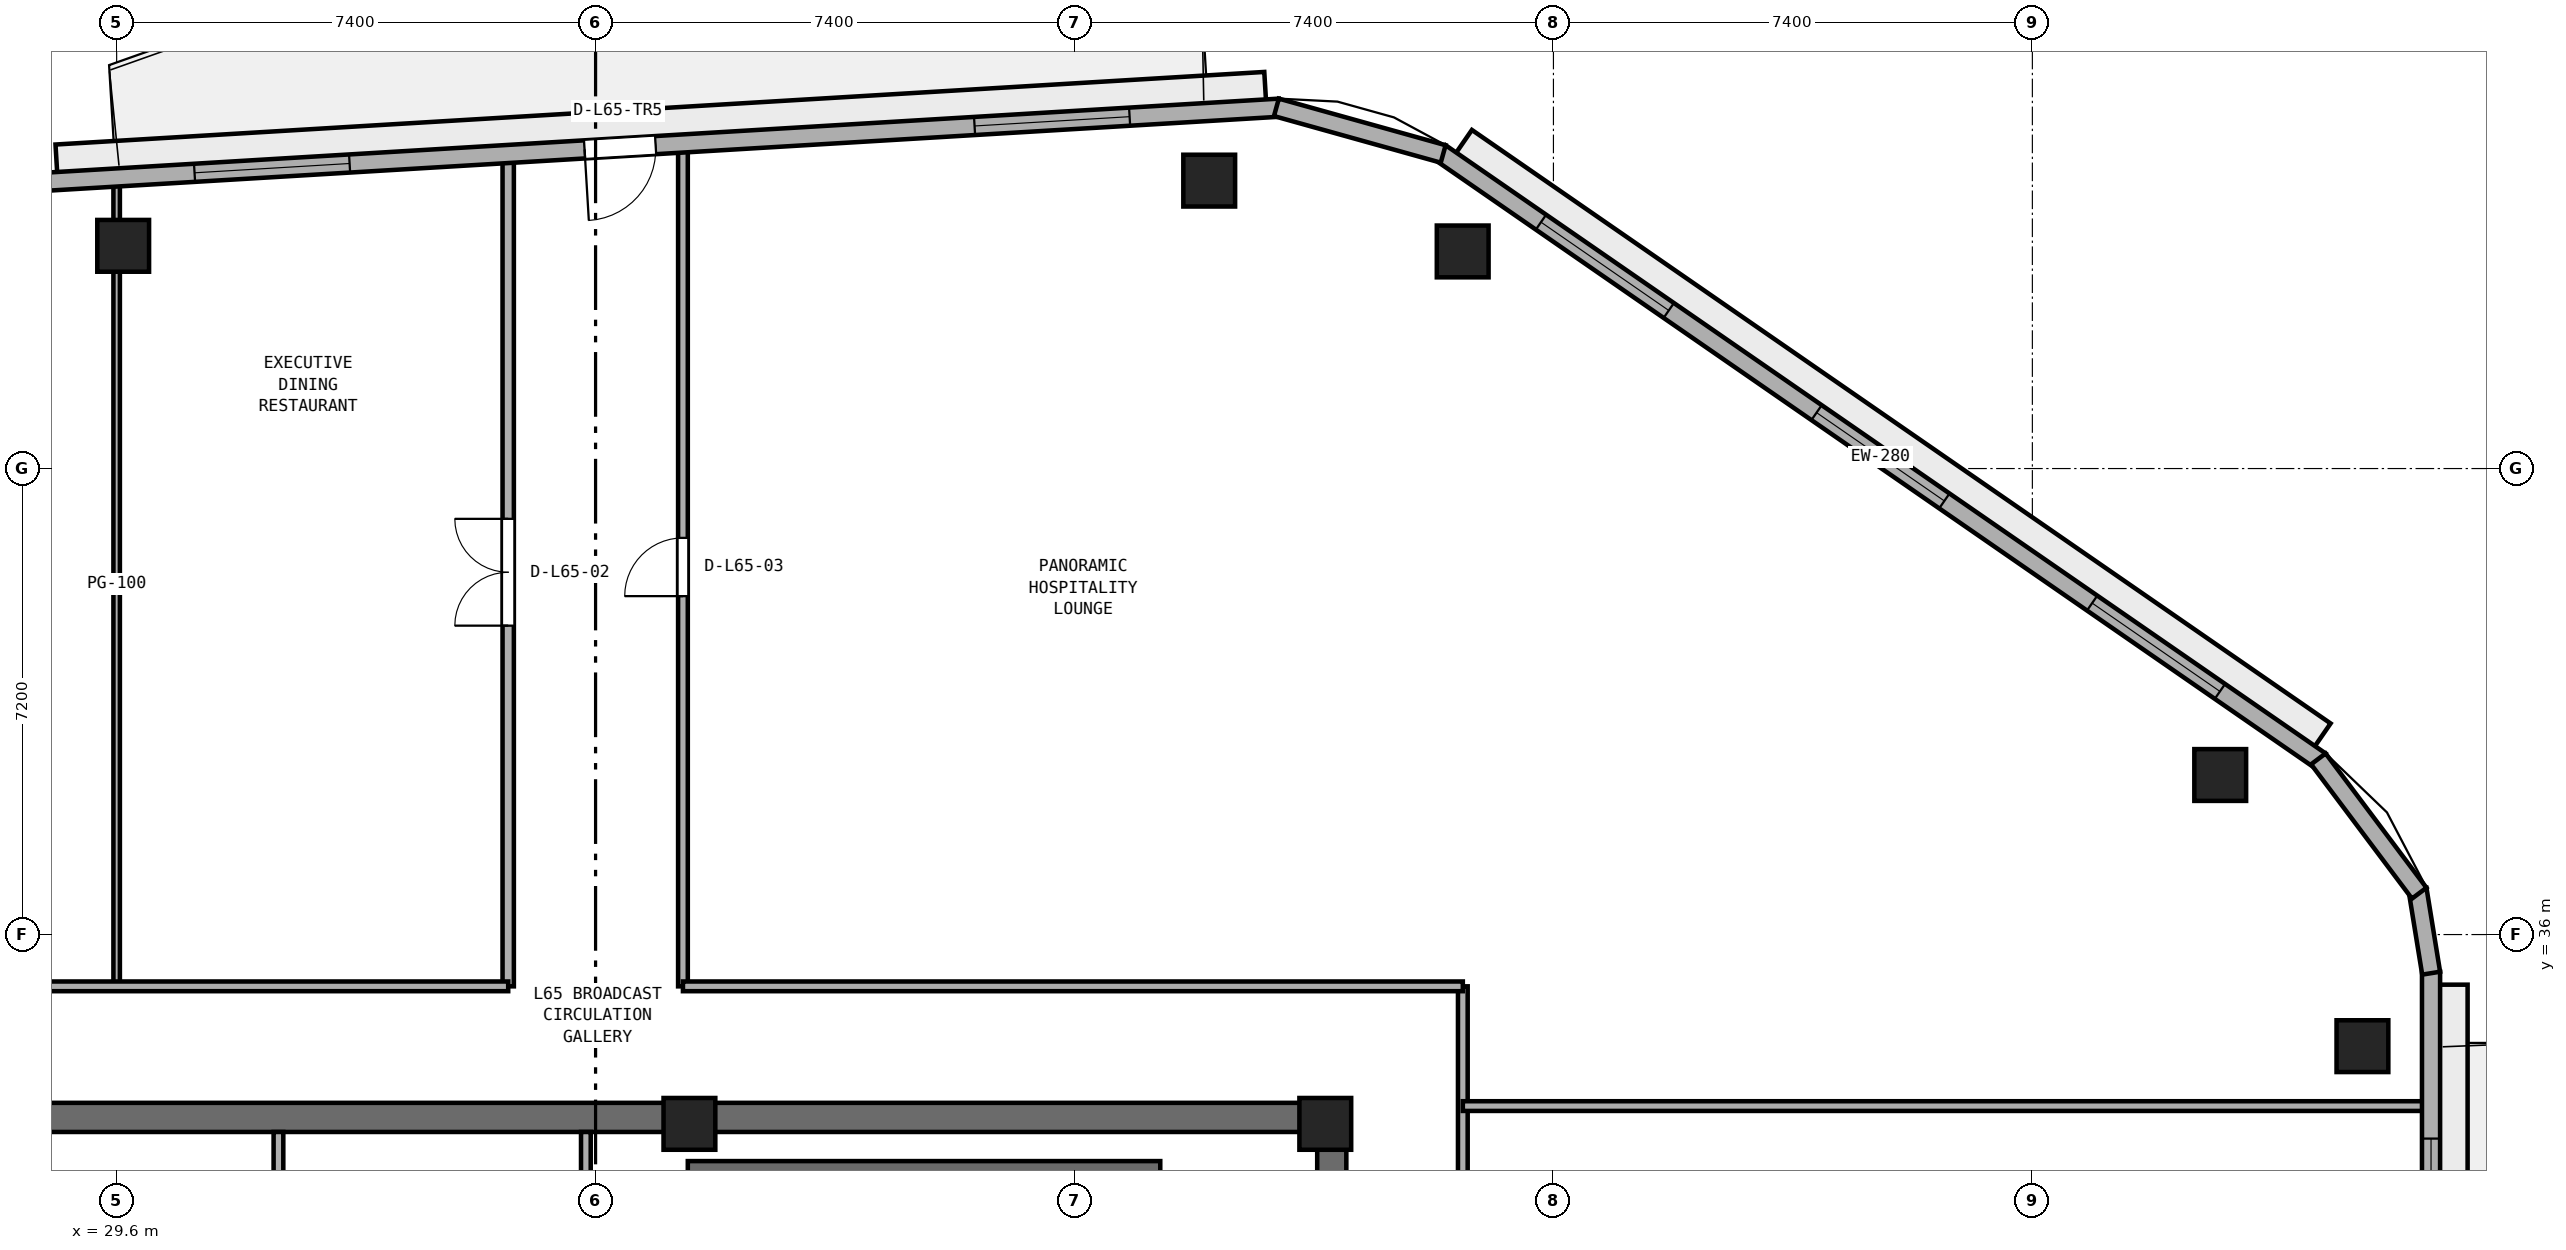
"""IFC4 building model, lengths in metres.
Left out: names, types, materials, properties, quantities, classifications, styles, units other than length and angle.
Written with IfcOpenShell. Run it as: python <this file> out.ifc"""

import sys

from ifc_helpers import new_model, si_unit, direction, frame, frame_2d, origin, origin_2d, place, context, subcontext, project, spatial, rectangle, extrude, element, fill, save


model = new_model("IFC4")
c1 = context("Model", 3, precision=1e-05, world=origin(), true_north=direction((0.0, 1.0)))
c2 = subcontext(c1, "Body", "Model", "MODEL_VIEW")
j1 = project(units=[si_unit("LENGTHUNIT", "METRE"), si_unit("PLANEANGLEUNIT", "RADIAN")], contexts=[c1])
p1 = place(None, origin())
s1 = spatial("IfcSite", under=j1, at=p1, CompositionType="ELEMENT")
p2 = place(p1, origin())
s2 = spatial("IfcBuilding", under=s1, at=p2, CompositionType="ELEMENT")
p3 = place(p2, frame((0.0, 0.0, 255.4)))
s3 = spatial("IfcBuildingStorey", under=s2, at=p3, CompositionType="ELEMENT", Elevation=255.4)
p4 = place(p3, frame((25.4, 33.175, 0.0), z_axis=(0.0, 0.0, 1.0), x_axis=(1.0, 0.0, 0.0)))
e1 = element("IfcWall", 1, at=p4, inside=s3, PredefinedType="SHEAR", context=c2, shape_type="SweptSolid", body=[
    extrude(rectangle(XDim=23.2, YDim=0.45, at=frame_2d((11.6, 0.0))), origin(), (0.0, 0.0, 1.0), 3.51),
])
p5 = place(p3, frame((48.375, 17.45, 0.0), z_axis=(0.0, 0.0, 1.0), x_axis=(0.0, 1.0, 0.0)))
e2 = element("IfcWall", 2, at=p5, inside=s3, PredefinedType="SHEAR", context=c2, shape_type="SweptSolid", body=[
    extrude(rectangle(XDim=15.5, YDim=0.45, at=frame_2d((7.75, 0.0))), origin(), (0.0, 0.0, 1.0), 3.51),
])
p6 = place(p5, frame((5.85, 0.0, 0.0)))
e3 = element("IfcOpeningElement", 3, at=p6, cuts=e2, PredefinedType="OPENING", context=c2, shape_type="SweptSolid", body=[
    extrude(rectangle(XDim=1.5, YDim=2.15, at=frame_2d((0.75, 1.075))), frame((0.0, 0.235, 0.0), z_axis=(0.0, -1.0, 0.0), x_axis=(1.0, 0.0, 0.0)), (0.0, 0.0, 1.0), 0.47),
])
for number, where, z_axis, x_axis in (
    (4, (48.275, 33.075, 0.0), (0.0, 0.0, 1.0), (1.0, 0.0, 0.0)),
    (5, (38.45, 33.075, 0.0), (0.0, 0.0, 1.0), (1.0, 0.0, 0.0)),
):
    element("IfcColumn", number, at=place(p3, frame(where, z_axis=z_axis, x_axis=x_axis)), inside=s3, PredefinedType="PILASTER", context=c2, shape_type="SweptSolid", body=[
        extrude(rectangle(XDim=0.8, YDim=0.8, at=origin_2d()), origin(), (0.0, 0.0, 1.0), 3.8),
    ])
for number, where, z_axis, x_axis in (
    (6, (64.3, 34.276, 0.0), (0.0, 0.0, 1.0), (1.0, 0.0, 0.0)),
    (7, (62.103, 38.465, 0.0), (0.0, 0.0, 1.0), (1.0, 0.0, 0.0)),
    (8, (50.398, 46.554, 0.0), (0.0, 0.0, 1.0), (1.0, 0.0, 0.0)),
    (9, (46.481, 47.648, 0.0), (0.0, 0.0, 1.0), (1.0, 0.0, 0.0)),
    (10, (29.701, 46.641, 0.0), (0.0, 0.0, 1.0), (1.0, 0.0, 0.0)),
):
    element("IfcColumn", number, at=place(p3, frame(where, z_axis=z_axis, x_axis=x_axis)), inside=s3, PredefinedType="COLUMN", context=c2, shape_type="SweptSolid", body=[
        extrude(rectangle(XDim=0.8, YDim=0.8, at=origin_2d()), origin(), (0.0, 0.0, 1.0), 3.8),
    ])
p7 = place(p3, frame((38.425, 32.375, 0.0), z_axis=(0.0, 0.0, 1.0), x_axis=(1.0, 0.0, 0.0)))
e11 = element("IfcWall", 11, at=p7, inside=s3, PredefinedType="SHEAR", context=c2, shape_type="SweptSolid", body=[
    extrude(rectangle(XDim=7.3, YDim=0.25, at=frame_2d((3.65, 0.0))), origin(), (0.0, 0.0, 1.0), 3.51),
])
for number, where, z_axis, x_axis in (
    (12, (32.1, 30.65, 0.0), (0.0, 0.0, 1.0), (0.0, 1.0, 0.0)),
    (13, (36.85, 30.65, 0.0), (0.0, 0.0, 1.0), (0.0, 1.0, 0.0)),
):
    element("IfcWall", number, at=place(p3, frame(where, z_axis=z_axis, x_axis=x_axis)), inside=s3, PredefinedType="PARTITIONING", context=c2, shape_type="SweptSolid", body=[
        extrude(rectangle(XDim=2.3, YDim=0.15, at=frame_2d((1.15, 0.0))), origin(), (0.0, 0.0, 1.0), 3.51),
    ])
p8 = place(p3, frame((50.4, 22.6, 0.0), z_axis=(0.0, 0.0, 1.0), x_axis=(0.0, 1.0, 0.0)))
e14 = element("IfcWall", 14, at=p8, inside=s3, PredefinedType="PARTITIONING", context=c2, shape_type="SweptSolid", body=[
    extrude(rectangle(XDim=12.6, YDim=0.15, at=frame_2d((6.3, 0.0))), origin(), (0.0, 0.0, 1.0), 3.51),
])
p9 = place(p8, frame((3.22, 0.0, 0.0)))
e15 = element("IfcOpeningElement", 15, at=p9, cuts=e14, PredefinedType="OPENING", context=c2, shape_type="SweptSolid", body=[
    extrude(rectangle(XDim=1.0, YDim=2.12, at=frame_2d((0.5, 1.06))), frame((0.0, 0.085, 0.0), z_axis=(0.0, -1.0, 0.0), x_axis=(1.0, 0.0, 0.0)), (0.0, 0.0, 1.0), 0.17),
])
p10 = place(p8, frame((8.525, 0.0, 0.0)))
e16 = element("IfcOpeningElement", 16, at=p10, cuts=e14, PredefinedType="OPENING", context=c2, shape_type="SweptSolid", body=[
    extrude(rectangle(XDim=0.9, YDim=2.1, at=frame_2d((0.45, 1.05))), frame((0.0, 0.085, 0.0), z_axis=(0.0, -1.0, 0.0), x_axis=(1.0, 0.0, 0.0)), (0.0, 0.0, 1.0), 0.17),
])
p11 = place(p3, frame((38.35, 35.2, 0.0), z_axis=(0.0, 0.0, 1.0), x_axis=(0.0, 1.0, 0.0)))
e17 = element("IfcWall", 17, at=p11, inside=s3, PredefinedType="PARTITIONING", context=c2, shape_type="SweptSolid", body=[
    extrude(rectangle(XDim=12.958, YDim=0.15, at=frame_2d((6.479, 0.0))), origin(), (0.0, 0.0, 1.0), 3.51),
])
p12 = place(p11, frame((6.029, 0.0, 0.0)))
e18 = element("IfcOpeningElement", 18, at=p12, cuts=e17, PredefinedType="OPENING", context=c2, shape_type="SweptSolid", body=[
    extrude(rectangle(XDim=0.9, YDim=2.1, at=frame_2d((0.45, 1.05))), frame((0.0, 0.085, 0.0), z_axis=(0.0, -1.0, 0.0), x_axis=(1.0, 0.0, 0.0)), (0.0, 0.0, 1.0), 0.17),
])
p13 = place(p3, frame((35.65, 35.2, 0.0), z_axis=(0.0, 0.0, 1.0), x_axis=(0.0, 1.0, 0.0)))
e19 = element("IfcWall", 19, at=p13, inside=s3, PredefinedType="PARTITIONING", context=c2, shape_type="SweptSolid", body=[
    extrude(rectangle(XDim=12.795, YDim=0.175, at=frame_2d((6.398, 0.0))), origin(), (0.0, 0.0, 1.0), 3.51),
])
p14 = place(p13, frame((5.573, 0.0, 0.0)))
e20 = element("IfcOpeningElement", 20, at=p14, cuts=e19, PredefinedType="OPENING", context=c2, shape_type="SweptSolid", body=[
    extrude(rectangle(XDim=1.65, YDim=2.15, at=frame_2d((0.825, 1.075))), frame((0.0, 0.097, 0.0), z_axis=(0.0, -1.0, 0.0), x_axis=(1.0, 0.0, 0.0)), (0.0, 0.0, 1.0), 0.195),
])
p15 = place(p3, frame((29.6, 35.2, 0.0), z_axis=(0.0, 0.0, 1.0), x_axis=(0.0, 1.0, 0.0)))
e21 = element("IfcWall", 21, at=p15, inside=s3, PredefinedType="PARTITIONING", context=c2, shape_type="SweptSolid", body=[
    extrude(rectangle(XDim=12.432, YDim=0.1, at=frame_2d((6.216, 0.0))), origin(), (0.0, 0.0, 1.0), 2.893),
])
p16 = place(p3, frame((50.4, 33.35, 0.0), z_axis=(0.0, 0.0, 1.0), x_axis=(1.0, 0.0, 0.0)))
e22 = element("IfcWall", 22, at=p16, inside=s3, PredefinedType="PARTITIONING", context=c2, shape_type="SweptSolid", body=[
    extrude(rectangle(XDim=14.895, YDim=0.15, at=frame_2d((7.448, 0.0))), origin(), (0.0, 0.0, 1.0), 2.893),
])
p17 = place(p3, frame((23.6, 35.2, 0.0), z_axis=(0.0, 0.0, 1.0), x_axis=(1.0, 0.0, 0.0)))
e23 = element("IfcWall", 23, at=p17, inside=s3, PredefinedType="PARTITIONING", context=c2, shape_type="SweptSolid", body=[
    extrude(rectangle(XDim=12.05, YDim=0.15, at=frame_2d((6.025, 0.0))), origin(), (0.0, 0.0, 1.0), 3.51),
])
p18 = place(p17, frame((2.62, 0.0, 0.0)))
e24 = element("IfcOpeningElement", 24, at=p18, cuts=e23, PredefinedType="OPENING", context=c2, shape_type="SweptSolid", body=[
    extrude(rectangle(XDim=1.0, YDim=2.12, at=frame_2d((0.5, 1.06))), frame((0.0, 0.085, 0.0), z_axis=(0.0, -1.0, 0.0), x_axis=(1.0, 0.0, 0.0)), (0.0, 0.0, 1.0), 0.17),
])
p19 = place(p3, frame((38.35, 35.2, 0.0), z_axis=(0.0, 0.0, 1.0), x_axis=(1.0, 0.0, 0.0)))
e25 = element("IfcWall", 25, at=p19, inside=s3, PredefinedType="PARTITIONING", context=c2, shape_type="SweptSolid", body=[
    extrude(rectangle(XDim=12.05, YDim=0.15, at=frame_2d((6.025, 0.0))), origin(), (0.0, 0.0, 1.0), 3.51),
])
p20 = place(p3, frame((65.36, 16.258, 0.0), z_axis=(0.0, 0.0, 1.0), x_axis=(0.0, 1.0, 0.0)))
e26 = element("IfcWall", 26, at=p20, inside=s3, PredefinedType="STANDARD", context=c2, shape_type="SweptSolid", body=[
    extrude(rectangle(XDim=19.168, YDim=0.28, at=frame_2d((9.584, 0.0))), origin(), (0.0, 0.0, 1.0), 3.51),
])
p21 = place(p20, frame((9.034, 0.0, 0.0)))
e27 = element("IfcOpeningElement", 27, at=p21, cuts=e26, PredefinedType="OPENING", context=c2, shape_type="SweptSolid", body=[
    extrude(rectangle(XDim=1.1, YDim=2.2, at=frame_2d((0.55, 1.1))), frame((0.0, 0.15, 0.0), z_axis=(0.0, -1.0, 0.0), x_axis=(1.0, 0.0, 0.0)), (0.0, 0.0, 1.0), 0.3),
])
p22 = place(p20, frame((2.328, 0.0, 0.9)))
e28 = element("IfcOpeningElement", 28, at=p22, cuts=e26, PredefinedType="OPENING", context=c2, shape_type="SweptSolid", body=[
    extrude(rectangle(XDim=2.4, YDim=1.75, at=frame_2d((1.2, 0.875))), frame((0.0, 0.15, 0.0), z_axis=(0.0, -1.0, 0.0), x_axis=(1.0, 0.0, 0.0)), (0.0, 0.0, 1.0), 0.3),
])
p23 = place(p20, frame((14.19, 0.0, 0.9)))
e29 = element("IfcOpeningElement", 29, at=p23, cuts=e26, PredefinedType="OPENING", context=c2, shape_type="SweptSolid", body=[
    extrude(rectangle(XDim=2.4, YDim=1.75, at=frame_2d((1.2, 0.875))), frame((0.0, 0.15, 0.0), z_axis=(0.0, -1.0, 0.0), x_axis=(1.0, 0.0, 0.0)), (0.0, 0.0, 1.0), 0.3),
])
p24 = place(p3, frame((63.651, 38.683, 0.0), z_axis=(0.0, 0.0, 1.0), x_axis=(-0.822655095, 0.568540759022, 0.0)))
e30 = element("IfcWall", 30, at=p24, inside=s3, PredefinedType="STANDARD", context=c2, shape_type="SweptSolid", body=[
    extrude(rectangle(XDim=16.528, YDim=0.28, at=frame_2d((8.264, 0.0))), origin(), (0.0, 0.0, 1.0), 3.51),
])
p25 = place(p24, frame((1.888, 0.0, 0.9)))
e31 = element("IfcOpeningElement", 31, at=p25, cuts=e30, PredefinedType="OPENING", context=c2, shape_type="SweptSolid", body=[
    extrude(rectangle(XDim=2.4, YDim=1.75, at=frame_2d((1.2, 0.875))), frame((0.0, 0.15, 0.0), z_axis=(0.0, -1.0, 0.0), x_axis=(1.0, 0.0, 0.0)), (0.0, 0.0, 1.0), 0.3),
])
p26 = place(p24, frame((7.064, 0.0, 0.9)))
e32 = element("IfcOpeningElement", 32, at=p26, cuts=e30, PredefinedType="OPENING", context=c2, shape_type="SweptSolid", body=[
    extrude(rectangle(XDim=2.4, YDim=1.75, at=frame_2d((1.2, 0.875))), frame((0.0, 0.15, 0.0), z_axis=(0.0, -1.0, 0.0), x_axis=(1.0, 0.0, 0.0)), (0.0, 0.0, 1.0), 0.3),
])
p27 = place(p24, frame((12.24, 0.0, 0.9)))
e33 = element("IfcOpeningElement", 33, at=p27, cuts=e30, PredefinedType="OPENING", context=c2, shape_type="SweptSolid", body=[
    extrude(rectangle(XDim=2.4, YDim=1.75, at=frame_2d((1.2, 0.875))), frame((0.0, 0.15, 0.0), z_axis=(0.0, -1.0, 0.0), x_axis=(1.0, 0.0, 0.0)), (0.0, 0.0, 1.0), 0.3),
])
p28 = place(p3, frame((47.566, 48.775, 0.0), z_axis=(0.0, 0.0, 1.0), x_axis=(-0.998202767485, -0.059926913695, 0.0)))
e34 = element("IfcWall", 34, at=p28, inside=s3, PredefinedType="STANDARD", context=c2, shape_type="SweptSolid", body=[
    extrude(rectangle(XDim=19.111, YDim=0.28, at=frame_2d((9.556, 0.0))), origin(), (0.0, 0.0, 1.0), 3.51),
])
p29 = place(p28, frame((9.656, 0.0, 0.0)))
e35 = element("IfcOpeningElement", 35, at=p29, cuts=e34, PredefinedType="OPENING", context=c2, shape_type="SweptSolid", body=[
    extrude(rectangle(XDim=1.1, YDim=2.2, at=frame_2d((0.55, 1.1))), frame((0.0, 0.15, 0.0), z_axis=(0.0, -1.0, 0.0), x_axis=(1.0, 0.0, 0.0)), (0.0, 0.0, 1.0), 0.3),
])
p30 = place(p28, frame((2.319, 0.0, 0.9)))
e36 = element("IfcOpeningElement", 36, at=p30, cuts=e34, PredefinedType="OPENING", context=c2, shape_type="SweptSolid", body=[
    extrude(rectangle(XDim=2.4, YDim=1.75, at=frame_2d((1.2, 0.875))), frame((0.0, 0.15, 0.0), z_axis=(0.0, -1.0, 0.0), x_axis=(1.0, 0.0, 0.0)), (0.0, 0.0, 1.0), 0.3),
])
p31 = place(p28, frame((14.392, 0.0, 0.9)))
e37 = element("IfcOpeningElement", 37, at=p31, cuts=e34, PredefinedType="OPENING", context=c2, shape_type="SweptSolid", body=[
    extrude(rectangle(XDim=2.4, YDim=1.75, at=frame_2d((1.2, 0.875))), frame((0.0, 0.15, 0.0), z_axis=(0.0, -1.0, 0.0), x_axis=(1.0, 0.0, 0.0)), (0.0, 0.0, 1.0), 0.3),
])
p32 = place(p3, frame((65.362, 35.403, 0.0), z_axis=(0.0, 0.0, 1.0), x_axis=(-0.160271674114, 0.987072940809, 0.0)))
e38 = element("IfcWall", 38, at=p32, inside=s3, PredefinedType="STANDARD", context=c2, shape_type="SweptSolid", body=[
    extrude(rectangle(XDim=1.315, YDim=0.28, at=frame_2d((0.657, 0.0))), origin(), (0.0, 0.0, 1.0), 3.51),
])
p33 = place(p3, frame((65.177, 36.639, 0.0), z_axis=(0.0, 0.0, 1.0), x_axis=(-0.600436386467, 0.799672524104, 0.0)))
e39 = element("IfcWall", 39, at=p33, inside=s3, PredefinedType="STANDARD", context=c2, shape_type="SweptSolid", body=[
    extrude(rectangle(XDim=2.595, YDim=0.28, at=frame_2d((1.298, 0.0))), origin(), (0.0, 0.0, 1.0), 3.51),
])
p34 = place(p3, frame((50.096, 48.061, 0.0), z_axis=(0.0, 0.0, 1.0), x_axis=(-0.963108887091, 0.269112005688, 0.0)))
e40 = element("IfcWall", 40, at=p34, inside=s3, PredefinedType="STANDARD", context=c2, shape_type="SweptSolid", body=[
    extrude(rectangle(XDim=2.675, YDim=0.28, at=frame_2d((1.338, 0.0))), origin(), (0.0, 0.0, 1.0), 3.51),
])
p35 = place(p14, origin())
e41 = element("IfcDoor", 41, at=p35, inside=s3, OperationType="DOUBLE_DOOR_SINGLE_SWING", PredefinedType="DOOR", context=c2, shape_type="SweptSolid", body=[
    extrude(rectangle(XDim=1.65, YDim=2.15, at=frame_2d((0.825, 1.075))), frame((0.0, 0.025, 0.0), z_axis=(0.0, -1.0, 0.0), x_axis=(1.0, 0.0, 0.0)), (0.0, 0.0, 1.0), 0.05),
])
fill(e20, e41)
p36 = place(p12, origin())
e42 = element("IfcDoor", 42, at=p36, inside=s3, OperationType="SINGLE_SWING_LEFT", PredefinedType="DOOR", context=c2, shape_type="SweptSolid", body=[
    extrude(rectangle(XDim=0.9, YDim=2.1, at=frame_2d((0.45, 1.05))), frame((0.0, 0.025, 0.0), z_axis=(0.0, -1.0, 0.0), x_axis=(1.0, 0.0, 0.0)), (0.0, 0.0, 1.0), 0.05),
])
fill(e18, e42)
p37 = place(p23, origin())
e43 = element("IfcWindow", 43, at=p37, inside=s3, PartitioningType="SINGLE_PANEL", PredefinedType="WINDOW", context=c2, shape_type="SweptSolid", body=[
    extrude(rectangle(XDim=2.4, YDim=1.75, at=frame_2d((1.2, 0.875))), frame((0.0, 0.03, 0.0), z_axis=(0.0, -1.0, 0.0), x_axis=(1.0, 0.0, 0.0)), (0.0, 0.0, 1.0), 0.06),
])
fill(e29, e43)
p38 = place(p25, origin())
e44 = element("IfcWindow", 44, at=p38, inside=s3, PartitioningType="SINGLE_PANEL", PredefinedType="WINDOW", context=c2, shape_type="SweptSolid", body=[
    extrude(rectangle(XDim=2.4, YDim=1.75, at=frame_2d((1.2, 0.875))), frame((0.0, 0.03, 0.0), z_axis=(0.0, -1.0, 0.0), x_axis=(1.0, 0.0, 0.0)), (0.0, 0.0, 1.0), 0.06),
])
fill(e31, e44)
p39 = place(p26, origin())
e45 = element("IfcWindow", 45, at=p39, inside=s3, PartitioningType="SINGLE_PANEL", PredefinedType="WINDOW", context=c2, shape_type="SweptSolid", body=[
    extrude(rectangle(XDim=2.4, YDim=1.75, at=frame_2d((1.2, 0.875))), frame((0.0, 0.03, 0.0), z_axis=(0.0, -1.0, 0.0), x_axis=(1.0, 0.0, 0.0)), (0.0, 0.0, 1.0), 0.06),
])
fill(e32, e45)
p40 = place(p27, origin())
e46 = element("IfcWindow", 46, at=p40, inside=s3, PartitioningType="SINGLE_PANEL", PredefinedType="WINDOW", context=c2, shape_type="SweptSolid", body=[
    extrude(rectangle(XDim=2.4, YDim=1.75, at=frame_2d((1.2, 0.875))), frame((0.0, 0.03, 0.0), z_axis=(0.0, -1.0, 0.0), x_axis=(1.0, 0.0, 0.0)), (0.0, 0.0, 1.0), 0.06),
])
fill(e33, e46)
p41 = place(p29, origin())
e47 = element("IfcDoor", 47, at=p41, inside=s3, OperationType="SINGLE_SWING_RIGHT", PredefinedType="DOOR", context=c2, shape_type="SweptSolid", body=[
    extrude(rectangle(XDim=1.1, YDim=2.2, at=frame_2d((0.55, 1.1))), frame((0.0, 0.025, 0.0), z_axis=(0.0, -1.0, 0.0), x_axis=(1.0, 0.0, 0.0)), (0.0, 0.0, 1.0), 0.05),
])
fill(e35, e47)
p42 = place(p30, origin())
e48 = element("IfcWindow", 48, at=p42, inside=s3, PartitioningType="SINGLE_PANEL", PredefinedType="WINDOW", context=c2, shape_type="SweptSolid", body=[
    extrude(rectangle(XDim=2.4, YDim=1.75, at=frame_2d((1.2, 0.875))), frame((0.0, 0.03, 0.0), z_axis=(0.0, -1.0, 0.0), x_axis=(1.0, 0.0, 0.0)), (0.0, 0.0, 1.0), 0.06),
])
fill(e36, e48)
p43 = place(p31, origin())
e49 = element("IfcWindow", 49, at=p43, inside=s3, PartitioningType="SINGLE_PANEL", PredefinedType="WINDOW", context=c2, shape_type="SweptSolid", body=[
    extrude(rectangle(XDim=2.4, YDim=1.75, at=frame_2d((1.2, 0.875))), frame((0.0, 0.03, 0.0), z_axis=(0.0, -1.0, 0.0), x_axis=(1.0, 0.0, 0.0)), (0.0, 0.0, 1.0), 0.06),
])
fill(e37, e49)
save(model, sys.argv[1])
